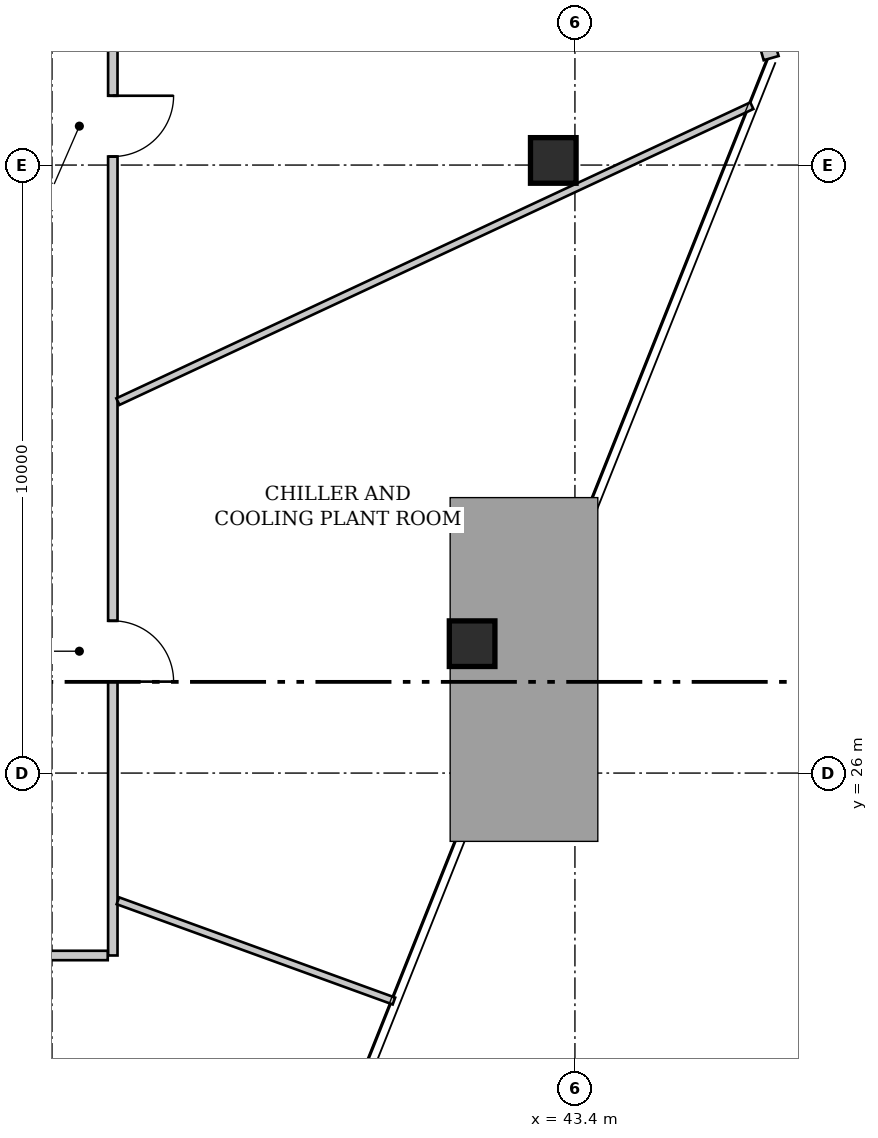
"""IFC4 building model, lengths in metres.
Left out: names, types, materials, properties, quantities, classifications, styles, units other than length and angle.
Written with IfcOpenShell. Run it as: python <this file> out.ifc"""

import sys

from ifc_helpers import new_model, si_unit, direction, frame, frame_2d, origin, origin_2d, place, context, subcontext, project, spatial, rectangle, hollow_rectangle, extrude, source, transform, mapped, element, fill, save


model = new_model("IFC4")
c1 = context("Model", 3, precision=1e-05, world=origin(), true_north=direction((0.0, 1.0)))
c2 = subcontext(c1, "Body", "Model", "MODEL_VIEW")
j1 = project(units=[si_unit("LENGTHUNIT", "METRE"), si_unit("PLANEANGLEUNIT", "RADIAN")], contexts=[c1])
p1 = place(None, origin())
s1 = spatial("IfcSite", under=j1, at=p1, CompositionType="ELEMENT")
p2 = place(p1, origin())
s2 = spatial("IfcBuilding", under=s1, at=p2, CompositionType="ELEMENT")
p3 = place(p2, frame((0.0, 0.0, 162.4)))
s3 = spatial("IfcBuildingStorey", under=s2, at=p3, CompositionType="ELEMENT", Elevation=162.4)
for number, where, z_axis, x_axis in (
    (1, (43.044, 36.076, 0.0), (0.0, 0.0, 1.0), (1.0, 0.0, 0.0)),
    (2, (41.709, 28.128, 0.0), (0.0, 0.0, 1.0), (1.0, 0.0, 0.0)),
):
    element("IfcColumn", number, at=place(p3, frame(where, z_axis=z_axis, x_axis=x_axis)), inside=s3, PredefinedType="COLUMN", context=c2, shape_type="SweptSolid", body=[
        extrude(hollow_rectangle(XDim=0.75, YDim=0.75, WallThickness=0.04, at=origin_2d()), origin(), (0.0, 0.0, 1.0), 4.15),
    ])
p4 = place(p3, frame((46.022, 39.891, 0.0), z_axis=(0.0, 0.0, 1.0), x_axis=(0.272713024776, -0.962095424642, 0.0)))
e3 = element("IfcWall", 3, at=p4, inside=s3, PredefinedType="SOLIDWALL", context=c2, shape_type="SweptSolid", body=[
    extrude(rectangle(XDim=2.217, YDim=0.255, at=frame_2d((1.108, 0.0))), origin(), (0.0, 0.0, 1.0), 4.15),
])
p5 = place(p3, frame((35.8, 41.267, 0.0), z_axis=(0.0, 0.0, 1.0), x_axis=(0.0, -1.0, 0.0)))
e4 = element("IfcWall", 4, at=p5, inside=s3, PredefinedType="PARTITIONING", context=c2, shape_type="SweptSolid", body=[
    extrude(rectangle(XDim=18.267, YDim=0.155, at=frame_2d((9.133, 0.0))), origin(), (0.0, 0.0, 1.0), 4.15),
])
p6 = place(p5, frame((12.762, 0.0, 0.0)))
e5 = element("IfcOpeningElement", 5, at=p6, cuts=e4, PredefinedType="OPENING", context=c2, shape_type="SweptSolid", body=[
    extrude(rectangle(XDim=1.0, YDim=2.15, at=frame_2d((0.5, 1.075))), frame((0.0, 0.087, 0.0), z_axis=(0.0, -1.0, 0.0), x_axis=(1.0, 0.0, 0.0)), (0.0, 0.0, 1.0), 0.175),
])
p7 = place(p5, frame((4.126, 0.0, 0.0)))
e6 = element("IfcOpeningElement", 6, at=p7, cuts=e4, PredefinedType="OPENING", context=c2, shape_type="SweptSolid", body=[
    extrude(rectangle(XDim=1.0, YDim=2.15, at=frame_2d((0.5, 1.075))), frame((0.0, 0.087, 0.0), z_axis=(0.0, -1.0, 0.0), x_axis=(1.0, 0.0, 0.0)), (0.0, 0.0, 1.0), 0.175),
])
p8 = place(p3, frame((35.717, 23.0, 0.0), z_axis=(0.0, 0.0, 1.0), x_axis=(-1.0, 0.0, 0.0)))
e7 = element("IfcWall", 7, at=p8, inside=s3, PredefinedType="PARTITIONING", context=c2, shape_type="SweptSolid", body=[
    extrude(rectangle(XDim=20.517, YDim=0.155, at=frame_2d((10.258, 0.0))), origin(), (0.0, 0.0, 1.0), 4.15),
])
p9 = place(p8, frame((16.507, 0.0, 0.0)))
e8 = element("IfcOpeningElement", 8, at=p9, cuts=e7, PredefinedType="OPENING", context=c2, shape_type="SweptSolid", body=[
    extrude(rectangle(XDim=1.0, YDim=2.15, at=frame_2d((0.5, 1.075))), frame((0.0, 0.087, 0.0), z_axis=(0.0, -1.0, 0.0), x_axis=(1.0, 0.0, 0.0)), (0.0, 0.0, 1.0), 0.175),
])
p10 = place(p8, frame((3.337, 0.0, 0.0)))
e9 = element("IfcOpeningElement", 9, at=p10, cuts=e7, PredefinedType="OPENING", context=c2, shape_type="SweptSolid", body=[
    extrude(rectangle(XDim=1.0, YDim=2.15, at=frame_2d((0.5, 1.075))), frame((0.0, 0.087, 0.0), z_axis=(0.0, -1.0, 0.0), x_axis=(1.0, 0.0, 0.0)), (0.0, 0.0, 1.0), 0.175),
])
p11 = place(p3, frame((35.884, 23.9, 0.0), z_axis=(0.0, 0.0, 1.0), x_axis=(0.939920279449, -0.341394007389, 0.0)))
e10 = element("IfcWall", 10, at=p11, inside=s3, PredefinedType="PARTITIONING", context=c2, shape_type="SweptSolid", body=[
    extrude(rectangle(XDim=4.83, YDim=0.12, at=frame_2d((2.415, 0.0))), origin(), (0.0, 0.0, 1.0), 4.15),
])
p12 = place(p3, frame((35.884, 32.109, 0.0), z_axis=(0.0, 0.0, 1.0), x_axis=(0.906109947942, 0.42304227004, 0.0)))
e11 = element("IfcWall", 11, at=p12, inside=s3, PredefinedType="PARTITIONING", context=c2, shape_type="SweptSolid", body=[
    extrude(rectangle(XDim=11.506, YDim=0.12, at=frame_2d((5.753, 0.0))), origin(), (0.0, 0.0, 1.0), 2.725),
])
m1 = source(origin(), c2, "Body", "SweptSolid", [
    extrude(rectangle(XDim=1.0, YDim=2.15, at=frame_2d((0.5, 1.075))), frame((0.0, 0.025, 0.0), z_axis=(0.0, -1.0, 0.0), x_axis=(1.0, 0.0, 0.0)), (0.0, 0.0, 1.0), 0.05),
])
p13 = place(p6, origin())
e12 = element("IfcDoor", 12, at=p13, inside=s3, OperationType="SINGLE_SWING_RIGHT", PredefinedType="DOOR", context=c2, shape_type="MappedRepresentation", body=[
    mapped(m1, transform((0.0, 0.0, 0.0), x_axis=(1.0, 0.0, 0.0), y_axis=(0.0, 1.0, 0.0), z_axis=(0.0, 0.0, 1.0), scale=1.0)),
])
fill(e5, e12)
p14 = place(p7, origin())
e13 = element("IfcDoor", 13, at=p14, inside=s3, OperationType="SINGLE_SWING_LEFT", PredefinedType="DOOR", context=c2, shape_type="MappedRepresentation", body=[
    mapped(m1, transform((0.0, 0.0, 0.0), x_axis=(1.0, 0.0, 0.0), y_axis=(0.0, 1.0, 0.0), z_axis=(0.0, 0.0, 1.0), scale=1.0)),
])
fill(e6, e13)
save(model, sys.argv[1])
